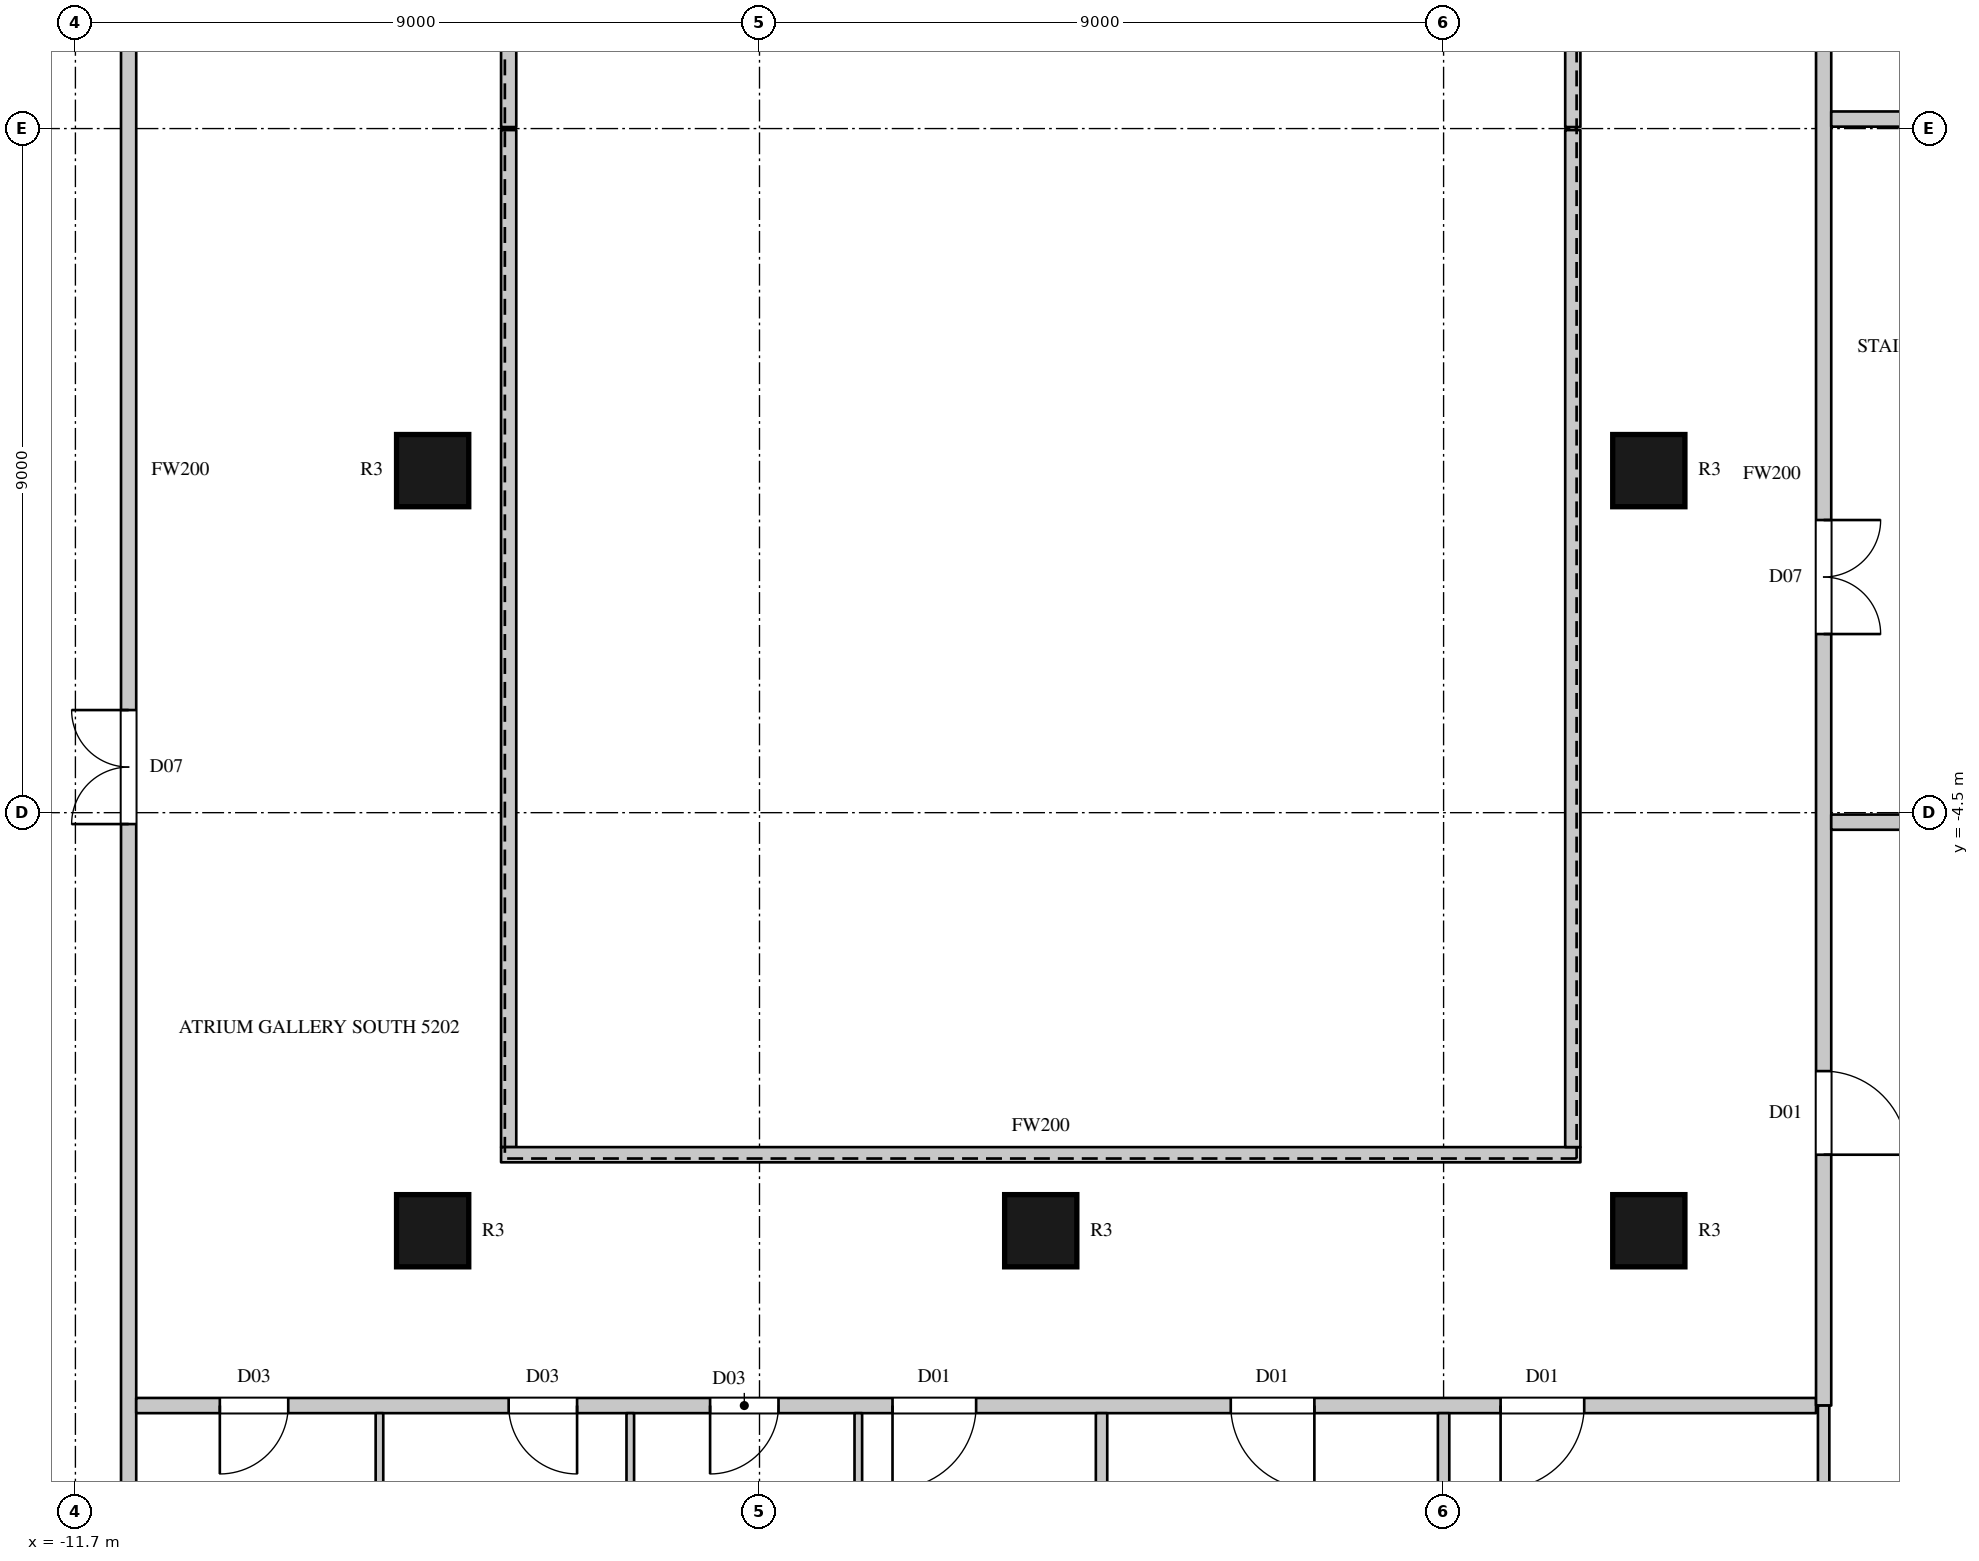
"""IFC4 building model, lengths in metres.
Left out: names, types, materials, properties, quantities, classifications, styles, units other than length and angle.
Written with IfcOpenShell. Run it as: python <this file> out.ifc"""

import sys

from ifc_helpers import new_model, si_unit, direction, frame, frame_2d, origin, origin_2d, place, context, subcontext, project, spatial, rectangle, circle, extrude, element, fill, save


model = new_model("IFC4")
c1 = context("Model", 3, precision=1e-05, world=origin(), true_north=direction((0.0, 1.0)))
c2 = subcontext(c1, "Body", "Model", "MODEL_VIEW")
j1 = project(units=[si_unit("LENGTHUNIT", "METRE"), si_unit("PLANEANGLEUNIT", "RADIAN")], contexts=[c1])
p1 = place(None, origin())
s1 = spatial("IfcSite", under=j1, at=p1, CompositionType="ELEMENT")
p2 = place(p1, origin())
s2 = spatial("IfcBuilding", under=s1, at=p2, CompositionType="ELEMENT")
p3 = place(p2, frame((0.0, 0.0, 234.3)))
s3 = spatial("IfcBuildingStorey", under=s2, at=p3, CompositionType="ELEMENT", Elevation=234.3)
for number, where, z_axis, x_axis in (
    (1, (-7.0, -10.0, 0.0), (0.0, 0.0, 1.0), (1.0, 0.0, 0.0)),
    (2, (-7.0, 0.0, 0.0), (0.0, 0.0, 1.0), (1.0, 0.0, 0.0)),
    (3, (1.0, -10.0, 0.0), (0.0, 0.0, 1.0), (1.0, 0.0, 0.0)),
    (4, (9.0, -10.0, 0.0), (0.0, 0.0, 1.0), (1.0, 0.0, 0.0)),
    (5, (9.0, 0.0, 0.0), (0.0, 0.0, 1.0), (1.0, 0.0, 0.0)),
):
    element("IfcColumn", number, at=place(p3, frame(where, z_axis=z_axis, x_axis=x_axis)), inside=s3, PredefinedType="COLUMN", context=c2, shape_type="SweptSolid", body=[
        extrude(circle(Radius=0.475, at=origin_2d()), origin(), (0.0, 0.0, 1.0), 4.1),
    ])
p4 = place(p3, frame((-11.0, -14.8, 0.0), z_axis=(0.0, 0.0, 1.0), x_axis=(0.0, 1.0, 0.0)))
e6 = element("IfcWall", 6, at=p4, inside=s3, PredefinedType="PARTITIONING", context=c2, shape_type="SweptSolid", body=[
    extrude(rectangle(XDim=29.6, YDim=0.2, at=frame_2d((14.8, 0.0))), origin(), (0.0, 0.0, 1.0), 3.8),
])
p5 = place(p4, frame((10.15, 0.0, 0.0)))
e7 = element("IfcOpeningElement", 7, at=p5, cuts=e6, PredefinedType="OPENING", context=c2, shape_type="SweptSolid", body=[
    extrude(rectangle(XDim=1.5, YDim=2.4, at=frame_2d((0.75, 1.2))), frame((0.0, 0.11, 0.0), z_axis=(0.0, -1.0, 0.0), x_axis=(1.0, 0.0, 0.0)), (0.0, 0.0, 1.0), 0.22),
])
p6 = place(p3, frame((-10.9, -12.3, 0.0), z_axis=(0.0, 0.0, 1.0), x_axis=(1.0, 0.0, 0.0)))
e8 = element("IfcWall", 8, at=p6, inside=s3, PredefinedType="PARTITIONING", context=c2, shape_type="SweptSolid", body=[
    extrude(rectangle(XDim=22.1, YDim=0.2, at=frame_2d((11.05, 0.0))), origin(), (0.0, 0.0, 1.0), 3.8),
])
p7 = place(p6, frame((1.1, 0.0, 0.0)))
e9 = element("IfcOpeningElement", 9, at=p7, cuts=e8, PredefinedType="OPENING", context=c2, shape_type="SweptSolid", body=[
    extrude(rectangle(XDim=0.9, YDim=2.2, at=frame_2d((0.45, 1.1))), frame((0.0, 0.11, 0.0), z_axis=(0.0, -1.0, 0.0), x_axis=(1.0, 0.0, 0.0)), (0.0, 0.0, 1.0), 0.22),
])
p8 = place(p6, frame((4.9, 0.0, 0.0)))
e10 = element("IfcOpeningElement", 10, at=p8, cuts=e8, PredefinedType="OPENING", context=c2, shape_type="SweptSolid", body=[
    extrude(rectangle(XDim=0.9, YDim=2.2, at=frame_2d((0.45, 1.1))), frame((0.0, 0.11, 0.0), z_axis=(0.0, -1.0, 0.0), x_axis=(1.0, 0.0, 0.0)), (0.0, 0.0, 1.0), 0.22),
])
p9 = place(p6, frame((7.55, 0.0, 0.0)))
e11 = element("IfcOpeningElement", 11, at=p9, cuts=e8, PredefinedType="OPENING", context=c2, shape_type="SweptSolid", body=[
    extrude(rectangle(XDim=0.9, YDim=2.2, at=frame_2d((0.45, 1.1))), frame((0.0, 0.11, 0.0), z_axis=(0.0, -1.0, 0.0), x_axis=(1.0, 0.0, 0.0)), (0.0, 0.0, 1.0), 0.22),
])
p10 = place(p6, frame((9.95, 0.0, 0.0)))
e12 = element("IfcOpeningElement", 12, at=p10, cuts=e8, PredefinedType="OPENING", context=c2, shape_type="SweptSolid", body=[
    extrude(rectangle(XDim=1.1, YDim=2.4, at=frame_2d((0.55, 1.2))), frame((0.0, 0.11, 0.0), z_axis=(0.0, -1.0, 0.0), x_axis=(1.0, 0.0, 0.0)), (0.0, 0.0, 1.0), 0.22),
])
p11 = place(p6, frame((14.4, 0.0, 0.0)))
e13 = element("IfcOpeningElement", 13, at=p11, cuts=e8, PredefinedType="OPENING", context=c2, shape_type="SweptSolid", body=[
    extrude(rectangle(XDim=1.1, YDim=2.4, at=frame_2d((0.55, 1.2))), frame((0.0, 0.11, 0.0), z_axis=(0.0, -1.0, 0.0), x_axis=(1.0, 0.0, 0.0)), (0.0, 0.0, 1.0), 0.22),
])
p12 = place(p6, frame((17.95, 0.0, 0.0)))
e14 = element("IfcOpeningElement", 14, at=p12, cuts=e8, PredefinedType="OPENING", context=c2, shape_type="SweptSolid", body=[
    extrude(rectangle(XDim=1.1, YDim=2.4, at=frame_2d((0.55, 1.2))), frame((0.0, 0.11, 0.0), z_axis=(0.0, -1.0, 0.0), x_axis=(1.0, 0.0, 0.0)), (0.0, 0.0, 1.0), 0.22),
])
p13 = place(p3, frame((-6.0, -8.9, 0.0), z_axis=(0.0, 0.0, 1.0), x_axis=(0.0, 1.0, 0.0)))
e15 = element("IfcWall", 15, at=p13, inside=s3, PredefinedType="PARTITIONING", context=c2, shape_type="SweptSolid", body=[
    extrude(rectangle(XDim=13.38, YDim=0.2, at=frame_2d((6.69, 0.0))), origin(), (0.0, 0.0, 1.0), 3.8),
])
p14 = place(p3, frame((-6.1, -9.0, 0.0), z_axis=(0.0, 0.0, 1.0), x_axis=(1.0, 0.0, 0.0)))
e16 = element("IfcWall", 16, at=p14, inside=s3, PredefinedType="PARTITIONING", context=c2, shape_type="SweptSolid", body=[
    extrude(rectangle(XDim=14.2, YDim=0.2, at=frame_2d((7.1, 0.0))), origin(), (0.0, 0.0, 1.0), 3.8),
])
p15 = place(p3, frame((-6.0, 4.52, 0.0), z_axis=(0.0, 0.0, 1.0), x_axis=(0.0, 1.0, 0.0)))
e17 = element("IfcWall", 17, at=p15, inside=s3, PredefinedType="PARTITIONING", context=c2, shape_type="SweptSolid", body=[
    extrude(rectangle(XDim=4.38, YDim=0.2, at=frame_2d((2.19, 0.0))), origin(), (0.0, 0.0, 1.0), 3.8),
])
p16 = place(p3, frame((8.0, -8.9, 0.0), z_axis=(0.0, 0.0, 1.0), x_axis=(0.0, 1.0, 0.0)))
e18 = element("IfcWall", 18, at=p16, inside=s3, PredefinedType="PARTITIONING", context=c2, shape_type="SweptSolid", body=[
    extrude(rectangle(XDim=13.38, YDim=0.2, at=frame_2d((6.69, 0.0))), origin(), (0.0, 0.0, 1.0), 3.8),
])
p17 = place(p3, frame((8.0, 4.52, 0.0), z_axis=(0.0, 0.0, 1.0), x_axis=(0.0, 1.0, 0.0)))
e19 = element("IfcWall", 19, at=p17, inside=s3, PredefinedType="PARTITIONING", context=c2, shape_type="SweptSolid", body=[
    extrude(rectangle(XDim=4.38, YDim=0.2, at=frame_2d((2.19, 0.0))), origin(), (0.0, 0.0, 1.0), 3.8),
])
p18 = place(p3, frame((11.3, -12.3, 0.0), z_axis=(0.0, 0.0, 1.0), x_axis=(0.0, 1.0, 0.0)))
e20 = element("IfcWall", 20, at=p18, inside=s3, PredefinedType="PARTITIONING", context=c2, shape_type="SweptSolid", body=[
    extrude(rectangle(XDim=24.5, YDim=0.2, at=frame_2d((12.25, 0.0))), origin(), (0.0, 0.0, 1.0), 3.8),
])
p19 = place(p18, frame((10.15, 0.0, 0.0)))
e21 = element("IfcOpeningElement", 21, at=p19, cuts=e20, PredefinedType="OPENING", context=c2, shape_type="SweptSolid", body=[
    extrude(rectangle(XDim=1.5, YDim=2.4, at=frame_2d((0.75, 1.2))), frame((0.0, 0.11, 0.0), z_axis=(0.0, -1.0, 0.0), x_axis=(1.0, 0.0, 0.0)), (0.0, 0.0, 1.0), 0.22),
])
p20 = place(p18, frame((3.3, 0.0, 0.0)))
e22 = element("IfcOpeningElement", 22, at=p20, cuts=e20, PredefinedType="OPENING", context=c2, shape_type="SweptSolid", body=[
    extrude(rectangle(XDim=1.1, YDim=2.4, at=frame_2d((0.55, 1.2))), frame((0.0, 0.11, 0.0), z_axis=(0.0, -1.0, 0.0), x_axis=(1.0, 0.0, 0.0)), (0.0, 0.0, 1.0), 0.22),
])
for number, where, z_axis, x_axis in (
    (23, (11.4, -4.625, 0.0), (0.0, 0.0, 1.0), (1.0, 0.0, 0.0)),
    (24, (11.4, 4.625, 0.0), (0.0, 0.0, 1.0), (1.0, 0.0, 0.0)),
):
    element("IfcWall", number, at=place(p3, frame(where, z_axis=z_axis, x_axis=x_axis)), inside=s3, PredefinedType="PARTITIONING", context=c2, shape_type="SweptSolid", body=[
        extrude(rectangle(XDim=3.275, YDim=0.2, at=frame_2d((1.638, 0.0))), origin(), (0.0, 0.0, 1.0), 3.8),
    ])
p21 = place(p3, frame((1.8, -16.7, 0.0), z_axis=(0.0, 0.0, 1.0), x_axis=(0.0, 1.0, 0.0)))
e25 = element("IfcWall", 25, at=p21, inside=s3, PredefinedType="PARTITIONING", context=c2, shape_type="SweptSolid", body=[
    extrude(rectangle(XDim=4.3, YDim=0.15, at=frame_2d((2.15, 0.0))), origin(), (0.0, 0.0, 1.0), 3.8),
])
p22 = place(p3, frame((6.3, -16.05, 0.0), z_axis=(0.0, 0.0, 1.0), x_axis=(0.0, 1.0, 0.0)))
e26 = element("IfcWall", 26, at=p22, inside=s3, PredefinedType="PARTITIONING", context=c2, shape_type="SweptSolid", body=[
    extrude(rectangle(XDim=3.65, YDim=0.15, at=frame_2d((1.825, 0.0))), origin(), (0.0, 0.0, 1.0), 3.25),
])
p23 = place(p3, frame((11.3, -16.7, 0.0), z_axis=(0.0, 0.0, 1.0), x_axis=(0.0, 1.0, 0.0)))
e27 = element("IfcWall", 27, at=p23, inside=s3, PredefinedType="PARTITIONING", context=c2, shape_type="SweptSolid", body=[
    extrude(rectangle(XDim=4.4, YDim=0.15, at=frame_2d((2.2, 0.0))), origin(), (0.0, 0.0, 1.0), 3.8),
])
for number, where, z_axis, x_axis in (
    (28, (-7.7, -16.7, 0.0), (0.0, 0.0, 1.0), (0.0, 1.0, 0.0)),
    (29, (-4.4, -16.7, 0.0), (0.0, 0.0, 1.0), (0.0, 1.0, 0.0)),
    (30, (-1.4, -16.7, 0.0), (0.0, 0.0, 1.0), (0.0, 1.0, 0.0)),
):
    element("IfcWall", number, at=place(p3, frame(where, z_axis=z_axis, x_axis=x_axis)), inside=s3, PredefinedType="PARTITIONING", context=c2, shape_type="SweptSolid", body=[
        extrude(rectangle(XDim=4.3, YDim=0.1, at=frame_2d((2.15, 0.0))), origin(), (0.0, 0.0, 1.0), 3.8),
    ])
p24 = place(p5, origin())
e31 = element("IfcDoor", 31, at=p24, inside=s3, OperationType="DOUBLE_DOOR_SINGLE_SWING", PredefinedType="DOOR", context=c2, shape_type="SweptSolid", body=[
    extrude(rectangle(XDim=1.5, YDim=2.4, at=frame_2d((0.75, 1.2))), frame((0.0, 0.025, 0.0), z_axis=(0.0, -1.0, 0.0), x_axis=(1.0, 0.0, 0.0)), (0.0, 0.0, 1.0), 0.05),
])
fill(e7, e31)
p25 = place(p19, origin())
e32 = element("IfcDoor", 32, at=p25, inside=s3, OperationType="DOUBLE_DOOR_SINGLE_SWING", PredefinedType="DOOR", context=c2, shape_type="SweptSolid", body=[
    extrude(rectangle(XDim=1.5, YDim=2.4, at=frame_2d((0.75, 1.2))), frame((0.0, 0.025, 0.0), z_axis=(0.0, -1.0, 0.0), x_axis=(1.0, 0.0, 0.0)), (0.0, 0.0, 1.0), 0.05),
])
fill(e21, e32)
p26 = place(p7, origin())
e33 = element("IfcDoor", 33, at=p26, inside=s3, OperationType="SINGLE_SWING_RIGHT", PredefinedType="DOOR", context=c2, shape_type="SweptSolid", body=[
    extrude(rectangle(XDim=0.9, YDim=2.2, at=frame_2d((0.45, 1.1))), frame((0.0, 0.025, 0.0), z_axis=(0.0, -1.0, 0.0), x_axis=(1.0, 0.0, 0.0)), (0.0, 0.0, 1.0), 0.05),
])
fill(e9, e33)
p27 = place(p8, origin())
e34 = element("IfcDoor", 34, at=p27, inside=s3, OperationType="SINGLE_SWING_LEFT", PredefinedType="DOOR", context=c2, shape_type="SweptSolid", body=[
    extrude(rectangle(XDim=0.9, YDim=2.2, at=frame_2d((0.45, 1.1))), frame((0.0, 0.025, 0.0), z_axis=(0.0, -1.0, 0.0), x_axis=(1.0, 0.0, 0.0)), (0.0, 0.0, 1.0), 0.05),
])
fill(e10, e34)
p28 = place(p9, origin())
e35 = element("IfcDoor", 35, at=p28, inside=s3, OperationType="SINGLE_SWING_RIGHT", PredefinedType="DOOR", context=c2, shape_type="SweptSolid", body=[
    extrude(rectangle(XDim=0.9, YDim=2.2, at=frame_2d((0.45, 1.1))), frame((0.0, 0.025, 0.0), z_axis=(0.0, -1.0, 0.0), x_axis=(1.0, 0.0, 0.0)), (0.0, 0.0, 1.0), 0.05),
])
fill(e11, e35)
p29 = place(p10, origin())
e36 = element("IfcDoor", 36, at=p29, inside=s3, OperationType="SINGLE_SWING_RIGHT", PredefinedType="DOOR", context=c2, shape_type="SweptSolid", body=[
    extrude(rectangle(XDim=1.1, YDim=2.4, at=frame_2d((0.55, 1.2))), frame((0.0, 0.025, 0.0), z_axis=(0.0, -1.0, 0.0), x_axis=(1.0, 0.0, 0.0)), (0.0, 0.0, 1.0), 0.05),
])
fill(e12, e36)
p30 = place(p11, origin())
e37 = element("IfcDoor", 37, at=p30, inside=s3, OperationType="SINGLE_SWING_LEFT", PredefinedType="DOOR", context=c2, shape_type="SweptSolid", body=[
    extrude(rectangle(XDim=1.1, YDim=2.4, at=frame_2d((0.55, 1.2))), frame((0.0, 0.025, 0.0), z_axis=(0.0, -1.0, 0.0), x_axis=(1.0, 0.0, 0.0)), (0.0, 0.0, 1.0), 0.05),
])
fill(e13, e37)
p31 = place(p12, origin())
e38 = element("IfcDoor", 38, at=p31, inside=s3, OperationType="SINGLE_SWING_RIGHT", PredefinedType="DOOR", context=c2, shape_type="SweptSolid", body=[
    extrude(rectangle(XDim=1.1, YDim=2.4, at=frame_2d((0.55, 1.2))), frame((0.0, 0.025, 0.0), z_axis=(0.0, -1.0, 0.0), x_axis=(1.0, 0.0, 0.0)), (0.0, 0.0, 1.0), 0.05),
])
fill(e14, e38)
p32 = place(p20, origin())
e39 = element("IfcDoor", 39, at=p32, inside=s3, OperationType="SINGLE_SWING_RIGHT", PredefinedType="DOOR", context=c2, shape_type="SweptSolid", body=[
    extrude(rectangle(XDim=1.1, YDim=2.4, at=frame_2d((0.55, 1.2))), frame((0.0, 0.025, 0.0), z_axis=(0.0, -1.0, 0.0), x_axis=(1.0, 0.0, 0.0)), (0.0, 0.0, 1.0), 0.05),
])
fill(e22, e39)
save(model, sys.argv[1])
